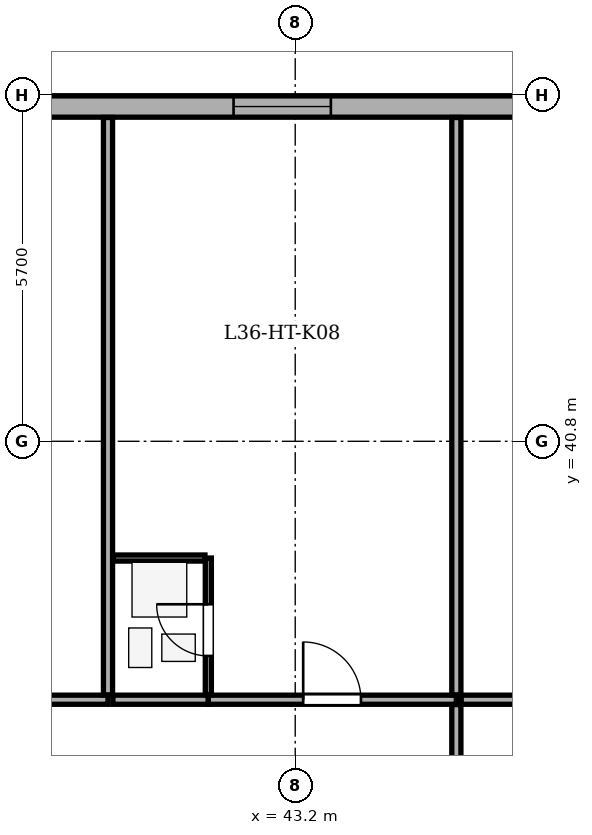
"""IFC4 building model, lengths in metres.
Left out: names, types, materials, properties, quantities, classifications, styles, units other than length and angle.
Written with IfcOpenShell. Run it as: python <this file> out.ifc"""

import sys

from ifc_helpers import new_model, si_unit, direction, frame, frame_2d, origin, place, context, subcontext, project, spatial, rectangle, extrude, element, fill, save


model = new_model("IFC4")
c1 = context("Model", 3, precision=1e-05, world=origin(), true_north=direction((0.0, 1.0)))
c2 = subcontext(c1, "Body", "Model", "MODEL_VIEW")
j1 = project(units=[si_unit("LENGTHUNIT", "METRE"), si_unit("PLANEANGLEUNIT", "RADIAN")], contexts=[c1])
p1 = place(None, origin())
s1 = spatial("IfcSite", under=j1, at=p1, CompositionType="ELEMENT")
p2 = place(p1, origin())
s2 = spatial("IfcBuilding", under=s1, at=p2, CompositionType="ELEMENT")
p3 = place(p2, frame((0.0, 0.0, 144.8)))
s3 = spatial("IfcBuildingStorey", under=s2, at=p3, CompositionType="ELEMENT", Elevation=144.8)
p4 = place(p3, frame((15.7, 46.305, 0.0), z_axis=(0.0, 0.0, 1.0), x_axis=(1.0, 0.0, 0.0)))
e1 = element("IfcWall", 1, at=p4, inside=s3, PredefinedType="STANDARD", context=c2, shape_type="SweptSolid", body=[
    extrude(rectangle(XDim=35.0, YDim=0.35, at=frame_2d((17.5, 0.0))), origin(), (0.0, 0.0, 1.0), 2.785),
])
p5 = place(p4, frame((8.0, 0.0, 0.0)))
e2 = element("IfcOpeningElement", 2, at=p5, cuts=e1, PredefinedType="OPENING", context=c2, shape_type="SweptSolid", body=[
    extrude(rectangle(XDim=1.0, YDim=2.02, at=frame_2d((0.5, 1.01))), frame((0.0, 0.185, 0.0), z_axis=(0.0, -1.0, 0.0), x_axis=(1.0, 0.0, 0.0)), (0.0, 0.0, 1.0), 0.37),
])
p6 = place(p4, frame((1.788, 0.0, 0.75)))
e3 = element("IfcOpeningElement", 3, at=p6, cuts=e1, PredefinedType="OPENING", context=c2, shape_type="SweptSolid", body=[
    extrude(rectangle(XDim=1.6, YDim=1.75, at=frame_2d((0.8, 0.875))), frame((0.0, 0.185, 0.0), z_axis=(0.0, -1.0, 0.0), x_axis=(1.0, 0.0, 0.0)), (0.0, 0.0, 1.0), 0.37),
])
p7 = place(p4, frame((14.495, 0.0, 0.75)))
e4 = element("IfcOpeningElement", 4, at=p7, cuts=e1, PredefinedType="OPENING", context=c2, shape_type="SweptSolid", body=[
    extrude(rectangle(XDim=1.6, YDim=1.75, at=frame_2d((0.8, 0.875))), frame((0.0, 0.185, 0.0), z_axis=(0.0, -1.0, 0.0), x_axis=(1.0, 0.0, 0.0)), (0.0, 0.0, 1.0), 0.37),
])
p8 = place(p4, frame((21.261, 0.0, 0.75)))
e5 = element("IfcOpeningElement", 5, at=p8, cuts=e1, PredefinedType="OPENING", context=c2, shape_type="SweptSolid", body=[
    extrude(rectangle(XDim=1.6, YDim=1.75, at=frame_2d((0.8, 0.875))), frame((0.0, 0.185, 0.0), z_axis=(0.0, -1.0, 0.0), x_axis=(1.0, 0.0, 0.0)), (0.0, 0.0, 1.0), 0.37),
])
p9 = place(p4, frame((26.486, 0.0, 0.75)))
e6 = element("IfcOpeningElement", 6, at=p9, cuts=e1, PredefinedType="OPENING", context=c2, shape_type="SweptSolid", body=[
    extrude(rectangle(XDim=1.6, YDim=1.75, at=frame_2d((0.8, 0.875))), frame((0.0, 0.185, 0.0), z_axis=(0.0, -1.0, 0.0), x_axis=(1.0, 0.0, 0.0)), (0.0, 0.0, 1.0), 0.37),
])
p10 = place(p4, frame((31.637, 0.0, 0.75)))
e7 = element("IfcOpeningElement", 7, at=p10, cuts=e1, PredefinedType="OPENING", context=c2, shape_type="SweptSolid", body=[
    extrude(rectangle(XDim=1.6, YDim=1.75, at=frame_2d((0.8, 0.875))), frame((0.0, 0.185, 0.0), z_axis=(0.0, -1.0, 0.0), x_axis=(1.0, 0.0, 0.0)), (0.0, 0.0, 1.0), 0.37),
])
p11 = place(p3, frame((35.44, 36.55, 0.0), z_axis=(0.0, 0.0, 1.0), x_axis=(1.0, 0.0, 0.0)))
e8 = element("IfcWall", 8, at=p11, inside=s3, PredefinedType="PARTITIONING", context=c2, shape_type="SweptSolid", body=[
    extrude(rectangle(XDim=4.681, YDim=0.15, at=frame_2d((2.341, 0.0))), origin(), (0.0, 0.0, 1.0), 3.2),
])
p12 = place(p11, frame((1.861, 0.0, 0.0)))
e9 = element("IfcOpeningElement", 9, at=p12, cuts=e8, PredefinedType="OPENING", context=c2, shape_type="SweptSolid", body=[
    extrude(rectangle(XDim=0.95, YDim=2.1, at=frame_2d((0.475, 1.05))), frame((0.0, 0.085, 0.0), z_axis=(0.0, -1.0, 0.0), x_axis=(1.0, 0.0, 0.0)), (0.0, 0.0, 1.0), 0.17),
])
p13 = place(p3, frame((40.121, 36.63, 0.0), z_axis=(0.0, 0.0, 1.0), x_axis=(0.0, 1.0, 0.0)))
e10 = element("IfcWall", 10, at=p13, inside=s3, PredefinedType="PARTITIONING", context=c2, shape_type="SweptSolid", body=[
    extrude(rectangle(XDim=9.495, YDim=0.15, at=frame_2d((4.748, 0.0))), origin(), (0.0, 0.0, 1.0), 3.2),
])
p14 = place(p3, frame((40.201, 36.55, 0.0), z_axis=(0.0, 0.0, 1.0), x_axis=(1.0, 0.0, 0.0)))
e11 = element("IfcWall", 11, at=p14, inside=s3, PredefinedType="PARTITIONING", context=c2, shape_type="SweptSolid", body=[
    extrude(rectangle(XDim=1.57, YDim=0.15, at=frame_2d((0.785, 0.0))), origin(), (0.0, 0.0, 1.0), 3.2),
])
p15 = place(p3, frame((41.771, 36.55, 0.0), z_axis=(0.0, 0.0, 1.0), x_axis=(1.0, 0.0, 0.0)))
e12 = element("IfcWall", 12, at=p15, inside=s3, PredefinedType="PARTITIONING", context=c2, shape_type="SweptSolid", body=[
    extrude(rectangle(XDim=4.079, YDim=0.15, at=frame_2d((2.04, 0.0))), origin(), (0.0, 0.0, 1.0), 3.2),
])
p16 = place(p15, frame((1.56, 0.0, 0.0)))
e13 = element("IfcOpeningElement", 13, at=p16, cuts=e12, PredefinedType="OPENING", context=c2, shape_type="SweptSolid", body=[
    extrude(rectangle(XDim=0.95, YDim=2.1, at=frame_2d((0.475, 1.05))), frame((0.0, 0.085, 0.0), z_axis=(0.0, -1.0, 0.0), x_axis=(1.0, 0.0, 0.0)), (0.0, 0.0, 1.0), 0.17),
])
p17 = place(p3, frame((41.771, 36.63, 0.0), z_axis=(0.0, 0.0, 1.0), x_axis=(0.0, 1.0, 0.0)))
e14 = element("IfcWall", 14, at=p17, inside=s3, PredefinedType="PARTITIONING", context=c2, shape_type="SweptSolid", body=[
    extrude(rectangle(XDim=2.25, YDim=0.1, at=frame_2d((1.125, 0.0))), origin(), (0.0, 0.0, 1.0), 3.2),
])
p18 = place(p17, frame((0.64, 0.0, 0.0)))
e15 = element("IfcOpeningElement", 15, at=p18, cuts=e14, PredefinedType="OPENING", context=c2, shape_type="SweptSolid", body=[
    extrude(rectangle(XDim=0.85, YDim=2.05, at=frame_2d((0.425, 1.025))), frame((0.0, 0.06, 0.0), z_axis=(0.0, -1.0, 0.0), x_axis=(1.0, 0.0, 0.0)), (0.0, 0.0, 1.0), 0.12),
])
p19 = place(p3, frame((40.201, 38.88, 0.0), z_axis=(0.0, 0.0, 1.0), x_axis=(1.0, 0.0, 0.0)))
e16 = element("IfcWall", 16, at=p19, inside=s3, PredefinedType="PARTITIONING", context=c2, shape_type="SweptSolid", body=[
    extrude(rectangle(XDim=1.515, YDim=0.1, at=frame_2d((0.758, 0.0))), origin(), (0.0, 0.0, 1.0), 3.2),
])
p20 = place(p3, frame((45.85, 36.63, 0.0), z_axis=(0.0, 0.0, 1.0), x_axis=(0.0, 1.0, 0.0)))
e17 = element("IfcWall", 17, at=p20, inside=s3, PredefinedType="PARTITIONING", context=c2, shape_type="SweptSolid", body=[
    extrude(rectangle(XDim=9.495, YDim=0.15, at=frame_2d((4.748, 0.0))), origin(), (0.0, 0.0, 1.0), 3.2),
])
p21 = place(p3, frame((45.93, 36.55, 0.0), z_axis=(0.0, 0.0, 1.0), x_axis=(1.0, 0.0, 0.0)))
e18 = element("IfcWall", 18, at=p21, inside=s3, PredefinedType="PARTITIONING", context=c2, shape_type="SweptSolid", body=[
    extrude(rectangle(XDim=9.395, YDim=0.15, at=frame_2d((4.698, 0.0))), origin(), (0.0, 0.0, 1.0), 3.2),
])
p22 = place(p3, frame((45.85, 17.93, 0.0), z_axis=(0.0, 0.0, 1.0), x_axis=(0.0, 1.0, 0.0)))
e19 = element("IfcWall", 19, at=p22, inside=s3, PredefinedType="PARTITIONING", context=c2, shape_type="SweptSolid", body=[
    extrude(rectangle(XDim=18.54, YDim=0.15, at=frame_2d((9.27, 0.0))), origin(), (0.0, 0.0, 1.0), 3.2),
])
p23 = place(p22, frame((8.79, 0.0, 0.0)))
e20 = element("IfcOpeningElement", 20, at=p23, cuts=e19, PredefinedType="OPENING", context=c2, shape_type="SweptSolid", body=[
    extrude(rectangle(XDim=0.95, YDim=2.1, at=frame_2d((0.475, 1.05))), frame((0.0, 0.085, 0.0), z_axis=(0.0, -1.0, 0.0), x_axis=(1.0, 0.0, 0.0)), (0.0, 0.0, 1.0), 0.17),
])
p24 = place(p9, origin())
e21 = element("IfcWindow", 21, at=p24, inside=s3, PartitioningType="SINGLE_PANEL", PredefinedType="WINDOW", context=c2, shape_type="SweptSolid", body=[
    extrude(rectangle(XDim=1.6, YDim=1.75, at=frame_2d((0.8, 0.875))), frame((0.0, -0.01, 0.0), z_axis=(0.0, -1.0, 0.0), x_axis=(1.0, 0.0, 0.0)), (0.0, 0.0, 1.0), 0.06),
])
fill(e6, e21)
p25 = place(p18, origin())
e22 = element("IfcDoor", 22, at=p25, inside=s3, OperationType="SINGLE_SWING_RIGHT", PredefinedType="DOOR", context=c2, shape_type="SweptSolid", body=[
    extrude(rectangle(XDim=0.85, YDim=2.05, at=frame_2d((0.425, 1.025))), frame((0.0, 0.025, 0.0), z_axis=(0.0, -1.0, 0.0), x_axis=(1.0, 0.0, 0.0)), (0.0, 0.0, 1.0), 0.05),
])
fill(e15, e22)
p26 = place(p16, origin())
e23 = element("IfcDoor", 23, at=p26, inside=s3, OperationType="SINGLE_SWING_LEFT", PredefinedType="DOOR", context=c2, shape_type="SweptSolid", body=[
    extrude(rectangle(XDim=0.95, YDim=2.1, at=frame_2d((0.475, 1.05))), frame((0.0, 0.025, 0.0), z_axis=(0.0, -1.0, 0.0), x_axis=(1.0, 0.0, 0.0)), (0.0, 0.0, 1.0), 0.05),
])
fill(e13, e23)
save(model, sys.argv[1])
